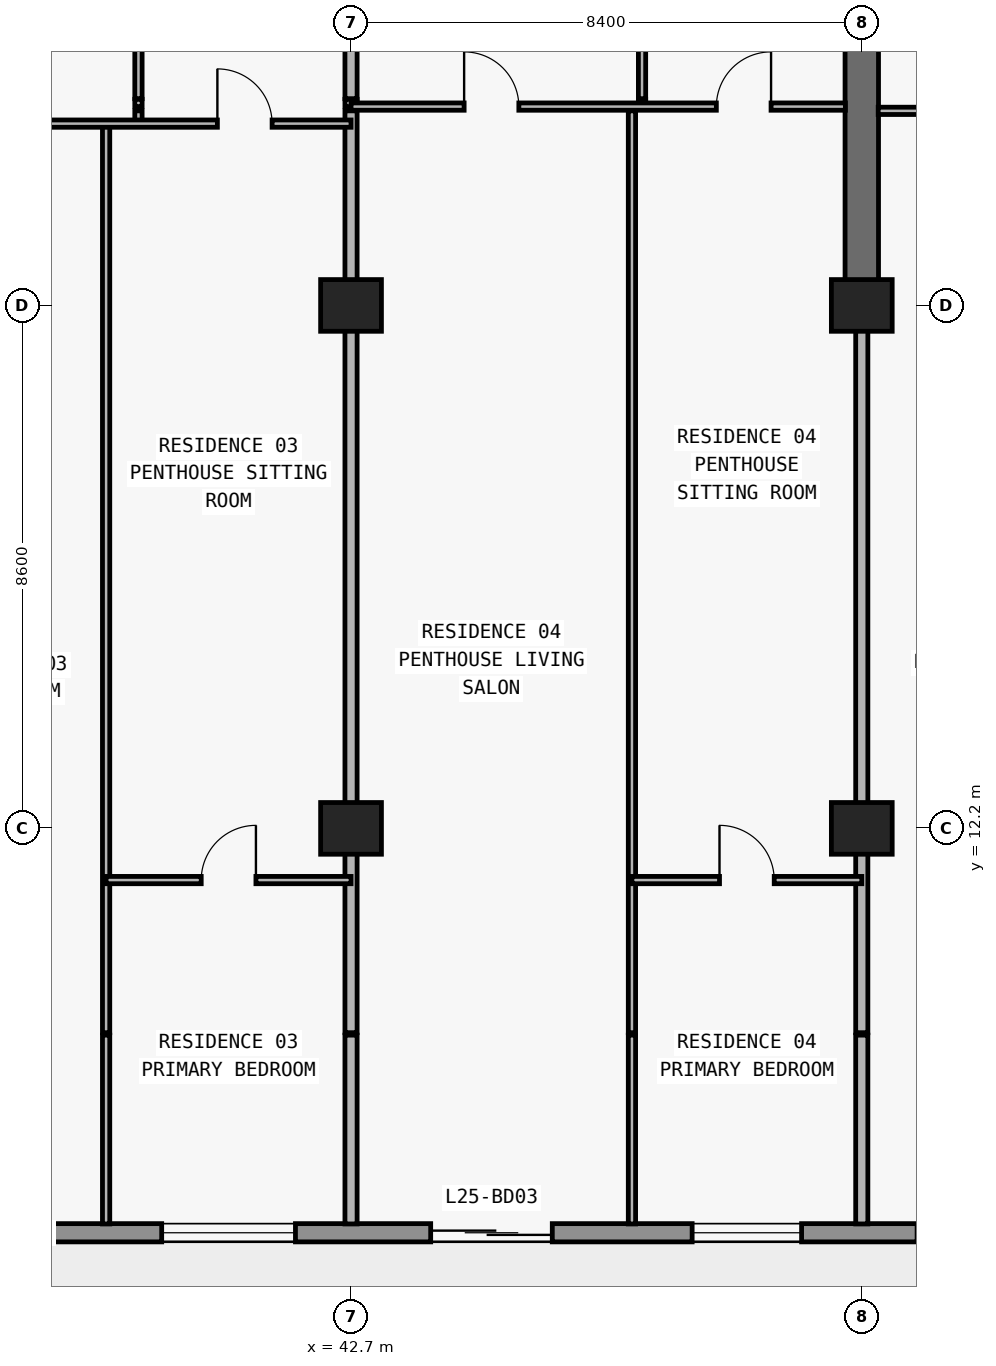
"""IFC4 building model, lengths in metres.
Left out: names, types, materials, properties, quantities, classifications, styles, units other than length and angle.
Written with IfcOpenShell. Run it as: python <this file> out.ifc"""

import sys

from ifc_helpers import new_model, si_unit, direction, frame, frame_2d, origin, origin_2d, place, context, subcontext, project, spatial, rectangle, extrude, element, fill, save


model = new_model("IFC4")
c1 = context("Model", 3, precision=1e-05, world=origin(), true_north=direction((0.0, 1.0)))
c2 = subcontext(c1, "Body", "Model", "MODEL_VIEW")
j1 = project(units=[si_unit("LENGTHUNIT", "METRE"), si_unit("PLANEANGLEUNIT", "RADIAN")], contexts=[c1])
p1 = place(None, origin())
s1 = spatial("IfcSite", under=j1, at=p1, CompositionType="ELEMENT")
p2 = place(p1, origin())
s2 = spatial("IfcBuilding", under=s1, at=p2, CompositionType="ELEMENT")
p3 = place(p2, frame((0.0, 0.0, 94.5)))
s3 = spatial("IfcBuildingStorey", under=s2, at=p3, CompositionType="ELEMENT", Elevation=94.5)
for number, where, z_axis, x_axis in (
    (1, (42.7, 12.2, 0.0), (0.0, 0.0, 1.0), (1.0, 0.0, 0.0)),
    (2, (51.1, 12.2, 0.0), (0.0, 0.0, 1.0), (1.0, 0.0, 0.0)),
    (3, (42.7, 20.8, 0.0), (0.0, 0.0, 1.0), (1.0, 0.0, 0.0)),
    (4, (51.1, 20.8, 0.0), (0.0, 0.0, 1.0), (1.0, 0.0, 0.0)),
):
    element("IfcColumn", number, at=place(p3, frame(where, z_axis=z_axis, x_axis=x_axis)), inside=s3, PredefinedType="COLUMN", context=c2, shape_type="SweptSolid", body=[
        extrude(rectangle(XDim=1.0, YDim=0.85, at=origin_2d()), origin(), (0.0, 0.0, 1.0), 3.0),
    ])
p4 = place(p3, frame((51.1, 20.8, 0.0), z_axis=(0.0, 0.0, 1.0), x_axis=(0.0, 1.0, 0.0)))
e5 = element("IfcWall", 5, at=p4, inside=s3, PredefinedType="SHEAR", context=c2, shape_type="SweptSolid", body=[
    extrude(rectangle(XDim=8.6, YDim=0.55, at=frame_2d((4.3, 0.0))), origin(), (0.0, 0.0, 1.0), 3.0),
])
p5 = place(p3, frame((70.1, 5.55, 0.0), z_axis=(0.0, 0.0, 1.0), x_axis=(-1.0, 0.0, 0.0)))
e6 = element("IfcWall", 6, at=p5, inside=s3, PredefinedType="STANDARD", context=c2, shape_type="SweptSolid", body=[
    extrude(rectangle(XDim=62.4, YDim=0.3, at=frame_2d((31.2, 0.0))), origin(), (0.0, 0.0, 1.0), 3.0),
])
p6 = place(p5, frame((57.29, 0.0, 0.0)))
e7 = element("IfcOpeningElement", 7, at=p6, cuts=e6, PredefinedType="OPENING", context=c2, shape_type="SweptSolid", body=[
    extrude(rectangle(XDim=2.0, YDim=2.3, at=frame_2d((1.0, 1.15))), frame((0.0, 0.16, 0.0), z_axis=(0.0, -1.0, 0.0), x_axis=(1.0, 0.0, 0.0)), (0.0, 0.0, 1.0), 0.32),
])
p7 = place(p5, frame((52.61, 0.0, 0.65)))
e8 = element("IfcOpeningElement", 8, at=p7, cuts=e6, PredefinedType="OPENING", context=c2, shape_type="SweptSolid", body=[
    extrude(rectangle(XDim=2.6, YDim=1.85, at=frame_2d((1.3, 0.925))), frame((0.0, 0.16, 0.0), z_axis=(0.0, -1.0, 0.0), x_axis=(1.0, 0.0, 0.0)), (0.0, 0.0, 1.0), 0.32),
])
p8 = place(p5, frame((46.5, 0.0, 0.85)))
e9 = element("IfcOpeningElement", 9, at=p8, cuts=e6, PredefinedType="OPENING", context=c2, shape_type="SweptSolid", body=[
    extrude(rectangle(XDim=2.2, YDim=1.55, at=frame_2d((1.1, 0.775))), frame((0.0, 0.16, 0.0), z_axis=(0.0, -1.0, 0.0), x_axis=(1.0, 0.0, 0.0)), (0.0, 0.0, 1.0), 0.32),
])
p9 = place(p5, frame((40.09, 0.0, 0.0)))
e10 = element("IfcOpeningElement", 10, at=p9, cuts=e6, PredefinedType="OPENING", context=c2, shape_type="SweptSolid", body=[
    extrude(rectangle(XDim=2.0, YDim=2.3, at=frame_2d((1.0, 1.15))), frame((0.0, 0.16, 0.0), z_axis=(0.0, -1.0, 0.0), x_axis=(1.0, 0.0, 0.0)), (0.0, 0.0, 1.0), 0.32),
])
p10 = place(p5, frame((35.99, 0.0, 0.85)))
e11 = element("IfcOpeningElement", 11, at=p10, cuts=e6, PredefinedType="OPENING", context=c2, shape_type="SweptSolid", body=[
    extrude(rectangle(XDim=1.8, YDim=1.55, at=frame_2d((0.9, 0.775))), frame((0.0, 0.16, 0.0), z_axis=(0.0, -1.0, 0.0), x_axis=(1.0, 0.0, 0.0)), (0.0, 0.0, 1.0), 0.32),
])
p11 = place(p5, frame((28.314, 0.0, 0.85)))
e12 = element("IfcOpeningElement", 12, at=p11, cuts=e6, PredefinedType="OPENING", context=c2, shape_type="SweptSolid", body=[
    extrude(rectangle(XDim=2.2, YDim=1.55, at=frame_2d((1.1, 0.775))), frame((0.0, 0.16, 0.0), z_axis=(0.0, -1.0, 0.0), x_axis=(1.0, 0.0, 0.0)), (0.0, 0.0, 1.0), 0.32),
])
p12 = place(p5, frame((24.09, 0.0, 0.0)))
e13 = element("IfcOpeningElement", 13, at=p12, cuts=e6, PredefinedType="OPENING", context=c2, shape_type="SweptSolid", body=[
    extrude(rectangle(XDim=2.0, YDim=2.3, at=frame_2d((1.0, 1.15))), frame((0.0, 0.16, 0.0), z_axis=(0.0, -1.0, 0.0), x_axis=(1.0, 0.0, 0.0)), (0.0, 0.0, 1.0), 0.32),
])
p13 = place(p5, frame((19.99, 0.0, 0.85)))
e14 = element("IfcOpeningElement", 14, at=p13, cuts=e6, PredefinedType="OPENING", context=c2, shape_type="SweptSolid", body=[
    extrude(rectangle(XDim=1.8, YDim=1.55, at=frame_2d((0.9, 0.775))), frame((0.0, 0.16, 0.0), z_axis=(0.0, -1.0, 0.0), x_axis=(1.0, 0.0, 0.0)), (0.0, 0.0, 1.0), 0.32),
])
p14 = place(p5, frame((16.09, 0.0, 0.0)))
e15 = element("IfcOpeningElement", 15, at=p14, cuts=e6, PredefinedType="OPENING", context=c2, shape_type="SweptSolid", body=[
    extrude(rectangle(XDim=2.0, YDim=2.3, at=frame_2d((1.0, 1.15))), frame((0.0, 0.16, 0.0), z_axis=(0.0, -1.0, 0.0), x_axis=(1.0, 0.0, 0.0)), (0.0, 0.0, 1.0), 0.32),
])
p15 = place(p5, frame((11.41, 0.0, 0.65)))
e16 = element("IfcOpeningElement", 16, at=p15, cuts=e6, PredefinedType="OPENING", context=c2, shape_type="SweptSolid", body=[
    extrude(rectangle(XDim=2.6, YDim=1.85, at=frame_2d((1.3, 0.925))), frame((0.0, 0.16, 0.0), z_axis=(0.0, -1.0, 0.0), x_axis=(1.0, 0.0, 0.0)), (0.0, 0.0, 1.0), 0.32),
])
p16 = place(p5, frame((5.3, 0.0, 0.85)))
e17 = element("IfcOpeningElement", 17, at=p16, cuts=e6, PredefinedType="OPENING", context=c2, shape_type="SweptSolid", body=[
    extrude(rectangle(XDim=2.2, YDim=1.55, at=frame_2d((1.1, 0.775))), frame((0.0, 0.16, 0.0), z_axis=(0.0, -1.0, 0.0), x_axis=(1.0, 0.0, 0.0)), (0.0, 0.0, 1.0), 0.32),
])
p17 = place(p3, frame((38.672, 5.695, 0.0), z_axis=(0.0, 0.0, 1.0), x_axis=(0.0, 1.0, 0.0)))
e18 = element("IfcWall", 18, at=p17, inside=s3, PredefinedType="PARTITIONING", context=c2, shape_type="SweptSolid", body=[
    extrude(rectangle(XDim=3.105, YDim=0.12, at=frame_2d((1.552, 0.0))), origin(), (0.0, 0.0, 1.0), 3.0),
])
p18 = place(p3, frame((38.672, 8.84, 0.0), z_axis=(0.0, 0.0, 1.0), x_axis=(0.0, 1.0, 0.0)))
e19 = element("IfcWall", 19, at=p18, inside=s3, PredefinedType="PARTITIONING", context=c2, shape_type="SweptSolid", body=[
    extrude(rectangle(XDim=14.95, YDim=0.12, at=frame_2d((7.475, 0.0))), origin(), (0.0, 0.0, 1.0), 2.436),
])
p19 = place(p3, frame((39.204, 23.79, 0.0), z_axis=(0.0, 0.0, 1.0), x_axis=(0.0, 1.0, 0.0)))
e20 = element("IfcWall", 20, at=p19, inside=s3, PredefinedType="PARTITIONING", context=c2, shape_type="SweptSolid", body=[
    extrude(rectangle(XDim=0.21, YDim=0.12, at=frame_2d((0.105, 0.0))), origin(), (0.0, 0.0, 1.0), 3.0),
])
p20 = place(p3, frame((39.204, 24.07, 0.0), z_axis=(0.0, 0.0, 1.0), x_axis=(0.0, 1.0, 0.0)))
e21 = element("IfcWall", 21, at=p20, inside=s3, PredefinedType="PARTITIONING", context=c2, shape_type="SweptSolid", body=[
    extrude(rectangle(XDim=0.12, YDim=0.12, at=frame_2d((0.06, 0.0))), origin(), (0.0, 0.0, 1.0), 3.0),
])
p21 = place(p3, frame((39.204, 24.2, 0.0), z_axis=(0.0, 0.0, 1.0), x_axis=(0.0, 1.0, 0.0)))
e22 = element("IfcWall", 22, at=p21, inside=s3, PredefinedType="PARTITIONING", context=c2, shape_type="SweptSolid", body=[
    extrude(rectangle(XDim=4.74, YDim=0.12, at=frame_2d((2.37, 0.0))), origin(), (0.0, 0.0, 1.0), 3.0),
])
p22 = place(p21, frame((1.92, 0.0, 0.0)))
e23 = element("IfcOpeningElement", 23, at=p22, cuts=e22, PredefinedType="OPENING", context=c2, shape_type="SweptSolid", body=[
    extrude(rectangle(XDim=0.9, YDim=2.15, at=frame_2d((0.45, 1.075))), frame((0.0, 0.07, 0.0), z_axis=(0.0, -1.0, 0.0), x_axis=(1.0, 0.0, 0.0)), (0.0, 0.0, 1.0), 0.14),
])
p23 = place(p3, frame((42.7, 5.695, 0.0), z_axis=(0.0, 0.0, 1.0), x_axis=(0.0, 1.0, 0.0)))
e24 = element("IfcWall", 24, at=p23, inside=s3, PredefinedType="PARTITIONING", context=c2, shape_type="SweptSolid", body=[
    extrude(rectangle(XDim=3.105, YDim=0.2, at=frame_2d((1.552, 0.0))), origin(), (0.0, 0.0, 1.0), 3.0),
])
p24 = place(p3, frame((42.7, 8.84, 0.0), z_axis=(0.0, 0.0, 1.0), x_axis=(0.0, 1.0, 0.0)))
e25 = element("IfcWall", 25, at=p24, inside=s3, PredefinedType="PARTITIONING", context=c2, shape_type="SweptSolid", body=[
    extrude(rectangle(XDim=15.16, YDim=0.2, at=frame_2d((7.58, 0.0))), origin(), (0.0, 0.0, 1.0), 2.124),
])
p25 = place(p3, frame((42.7, 24.07, 0.0), z_axis=(0.0, 0.0, 1.0), x_axis=(0.0, 1.0, 0.0)))
e26 = element("IfcWall", 26, at=p25, inside=s3, PredefinedType="PARTITIONING", context=c2, shape_type="SweptSolid", body=[
    extrude(rectangle(XDim=0.12, YDim=0.2, at=frame_2d((0.06, 0.0))), origin(), (0.0, 0.0, 1.0), 2.124),
])
p26 = place(p3, frame((42.7, 24.2, 0.0), z_axis=(0.0, 0.0, 1.0), x_axis=(0.0, 1.0, 0.0)))
e27 = element("IfcWall", 27, at=p26, inside=s3, PredefinedType="PARTITIONING", context=c2, shape_type="SweptSolid", body=[
    extrude(rectangle(XDim=5.14, YDim=0.2, at=frame_2d((2.57, 0.0))), origin(), (0.0, 0.0, 1.0), 2.124),
])
p27 = place(p3, frame((47.32, 5.695, 0.0), z_axis=(0.0, 0.0, 1.0), x_axis=(0.0, 1.0, 0.0)))
e28 = element("IfcWall", 28, at=p27, inside=s3, PredefinedType="PARTITIONING", context=c2, shape_type="SweptSolid", body=[
    extrude(rectangle(XDim=3.105, YDim=0.12, at=frame_2d((1.552, 0.0))), origin(), (0.0, 0.0, 1.0), 3.0),
])
p28 = place(p3, frame((47.32, 8.84, 0.0), z_axis=(0.0, 0.0, 1.0), x_axis=(0.0, 1.0, 0.0)))
e29 = element("IfcWall", 29, at=p28, inside=s3, PredefinedType="PARTITIONING", context=c2, shape_type="SweptSolid", body=[
    extrude(rectangle(XDim=15.16, YDim=0.12, at=frame_2d((7.58, 0.0))), origin(), (0.0, 0.0, 1.0), 3.0),
])
p29 = place(p3, frame((47.486, 24.07, 0.0), z_axis=(0.0, 0.0, 1.0), x_axis=(0.0, 1.0, 0.0)))
e30 = element("IfcWall", 30, at=p29, inside=s3, PredefinedType="PARTITIONING", context=c2, shape_type="SweptSolid", body=[
    extrude(rectangle(XDim=0.12, YDim=0.12, at=frame_2d((0.06, 0.0))), origin(), (0.0, 0.0, 1.0), 3.0),
])
p30 = place(p3, frame((47.486, 24.2, 0.0), z_axis=(0.0, 0.0, 1.0), x_axis=(0.0, 1.0, 0.0)))
e31 = element("IfcWall", 31, at=p30, inside=s3, PredefinedType="PARTITIONING", context=c2, shape_type="SweptSolid", body=[
    extrude(rectangle(XDim=5.02, YDim=0.12, at=frame_2d((2.51, 0.0))), origin(), (0.0, 0.0, 1.0), 3.0),
])
p31 = place(p30, frame((2.06, 0.0, 0.0)))
e32 = element("IfcOpeningElement", 32, at=p31, cuts=e31, PredefinedType="OPENING", context=c2, shape_type="SweptSolid", body=[
    extrude(rectangle(XDim=0.9, YDim=2.15, at=frame_2d((0.45, 1.075))), frame((0.0, 0.07, 0.0), z_axis=(0.0, -1.0, 0.0), x_axis=(1.0, 0.0, 0.0)), (0.0, 0.0, 1.0), 0.14),
])
p32 = place(p3, frame((51.1, 5.695, 0.0), z_axis=(0.0, 0.0, 1.0), x_axis=(0.0, 1.0, 0.0)))
e33 = element("IfcWall", 33, at=p32, inside=s3, PredefinedType="PARTITIONING", context=c2, shape_type="SweptSolid", body=[
    extrude(rectangle(XDim=3.105, YDim=0.2, at=frame_2d((1.552, 0.0))), origin(), (0.0, 0.0, 1.0), 3.0),
])
p33 = place(p3, frame((51.1, 8.84, 0.0), z_axis=(0.0, 0.0, 1.0), x_axis=(0.0, 1.0, 0.0)))
e34 = element("IfcWall", 34, at=p33, inside=s3, PredefinedType="PARTITIONING", context=c2, shape_type="SweptSolid", body=[
    extrude(rectangle(XDim=11.955, YDim=0.2, at=frame_2d((5.978, 0.0))), origin(), (0.0, 0.0, 1.0), 2.124),
])
p34 = place(p3, frame((38.672, 11.35, 0.0), z_axis=(0.0, 0.0, 1.0), x_axis=(1.0, 0.0, 0.0)))
e35 = element("IfcWall", 35, at=p34, inside=s3, PredefinedType="PARTITIONING", context=c2, shape_type="SweptSolid", body=[
    extrude(rectangle(XDim=4.028, YDim=0.12, at=frame_2d((2.014, 0.0))), origin(), (0.0, 0.0, 1.0), 3.0),
])
p35 = place(p34, frame((1.564, 0.0, 0.0)))
e36 = element("IfcOpeningElement", 36, at=p35, cuts=e35, PredefinedType="OPENING", context=c2, shape_type="SweptSolid", body=[
    extrude(rectangle(XDim=0.9, YDim=2.15, at=frame_2d((0.45, 1.075))), frame((0.0, 0.07, 0.0), z_axis=(0.0, -1.0, 0.0), x_axis=(1.0, 0.0, 0.0)), (0.0, 0.0, 1.0), 0.14),
])
p36 = place(p3, frame((47.32, 11.35, 0.0), z_axis=(0.0, 0.0, 1.0), x_axis=(1.0, 0.0, 0.0)))
e37 = element("IfcWall", 37, at=p36, inside=s3, PredefinedType="PARTITIONING", context=c2, shape_type="SweptSolid", body=[
    extrude(rectangle(XDim=3.78, YDim=0.12, at=frame_2d((1.89, 0.0))), origin(), (0.0, 0.0, 1.0), 3.0),
])
p37 = place(p36, frame((1.44, 0.0, 0.0)))
e38 = element("IfcOpeningElement", 38, at=p37, cuts=e37, PredefinedType="OPENING", context=c2, shape_type="SweptSolid", body=[
    extrude(rectangle(XDim=0.9, YDim=2.15, at=frame_2d((0.45, 1.075))), frame((0.0, 0.07, 0.0), z_axis=(0.0, -1.0, 0.0), x_axis=(1.0, 0.0, 0.0)), (0.0, 0.0, 1.0), 0.14),
])
p38 = place(p3, frame((35.1, 23.79, 0.0), z_axis=(0.0, 0.0, 1.0), x_axis=(1.0, 0.0, 0.0)))
e39 = element("IfcWall", 39, at=p38, inside=s3, PredefinedType="PARTITIONING", context=c2, shape_type="SweptSolid", body=[
    extrude(rectangle(XDim=7.6, YDim=0.12, at=frame_2d((3.8, 0.0))), origin(), (0.0, 0.0, 1.0), 3.0),
])
p39 = place(p38, frame((1.336, 0.0, 0.0)))
e40 = element("IfcOpeningElement", 40, at=p39, cuts=e39, PredefinedType="OPENING", context=c2, shape_type="SweptSolid", body=[
    extrude(rectangle(XDim=0.9, YDim=2.15, at=frame_2d((0.45, 1.075))), frame((0.0, 0.07, 0.0), z_axis=(0.0, -1.0, 0.0), x_axis=(1.0, 0.0, 0.0)), (0.0, 0.0, 1.0), 0.14),
])
p40 = place(p38, frame((5.402, 0.0, 0.0)))
e41 = element("IfcOpeningElement", 41, at=p40, cuts=e39, PredefinedType="OPENING", context=c2, shape_type="SweptSolid", body=[
    extrude(rectangle(XDim=0.9, YDim=2.15, at=frame_2d((0.45, 1.075))), frame((0.0, 0.07, 0.0), z_axis=(0.0, -1.0, 0.0), x_axis=(1.0, 0.0, 0.0)), (0.0, 0.0, 1.0), 0.14),
])
p41 = place(p3, frame((51.37, 24.0, 0.0), z_axis=(0.0, 0.0, 1.0), x_axis=(1.0, 0.0, 0.0)))
e42 = element("IfcWall", 42, at=p41, inside=s3, PredefinedType="PARTITIONING", context=c2, shape_type="SweptSolid", body=[
    extrude(rectangle(XDim=8.13, YDim=0.12, at=frame_2d((4.065, 0.0))), origin(), (0.0, 0.0, 1.0), 3.0),
])
p42 = place(p41, frame((1.305, 0.0, 0.0)))
e43 = element("IfcOpeningElement", 43, at=p42, cuts=e42, PredefinedType="OPENING", context=c2, shape_type="SweptSolid", body=[
    extrude(rectangle(XDim=0.9, YDim=2.15, at=frame_2d((0.45, 1.075))), frame((0.0, 0.07, 0.0), z_axis=(0.0, -1.0, 0.0), x_axis=(1.0, 0.0, 0.0)), (0.0, 0.0, 1.0), 0.14),
])
p43 = place(p3, frame((42.7, 24.07, 0.0), z_axis=(0.0, 0.0, 1.0), x_axis=(1.0, 0.0, 0.0)))
e44 = element("IfcWall", 44, at=p43, inside=s3, PredefinedType="PARTITIONING", context=c2, shape_type="SweptSolid", body=[
    extrude(rectangle(XDim=8.13, YDim=0.12, at=frame_2d((4.065, 0.0))), origin(), (0.0, 0.0, 1.0), 3.0),
])
p44 = place(p43, frame((1.86, 0.0, 0.0)))
e45 = element("IfcOpeningElement", 45, at=p44, cuts=e44, PredefinedType="OPENING", context=c2, shape_type="SweptSolid", body=[
    extrude(rectangle(XDim=0.9, YDim=2.15, at=frame_2d((0.45, 1.075))), frame((0.0, 0.07, 0.0), z_axis=(0.0, -1.0, 0.0), x_axis=(1.0, 0.0, 0.0)), (0.0, 0.0, 1.0), 0.14),
])
p45 = place(p43, frame((6.008, 0.0, 0.0)))
e46 = element("IfcOpeningElement", 46, at=p45, cuts=e44, PredefinedType="OPENING", context=c2, shape_type="SweptSolid", body=[
    extrude(rectangle(XDim=0.9, YDim=2.15, at=frame_2d((0.45, 1.075))), frame((0.0, 0.07, 0.0), z_axis=(0.0, -1.0, 0.0), x_axis=(1.0, 0.0, 0.0)), (0.0, 0.0, 1.0), 0.14),
])
p46 = place(p11, origin())
e47 = element("IfcWindow", 47, at=p46, inside=s3, PartitioningType="SINGLE_PANEL", PredefinedType="WINDOW", context=c2, shape_type="SweptSolid", body=[
    extrude(rectangle(XDim=2.2, YDim=1.55, at=frame_2d((1.1, 0.775))), frame((0.0, 0.03, 0.0), z_axis=(0.0, -1.0, 0.0), x_axis=(1.0, 0.0, 0.0)), (0.0, 0.0, 1.0), 0.06),
])
fill(e12, e47)
p47 = place(p12, origin())
e48 = element("IfcDoor", 48, at=p47, inside=s3, OperationType="DOUBLE_DOOR_SLIDING", PredefinedType="DOOR", context=c2, shape_type="SweptSolid", body=[
    extrude(rectangle(XDim=2.0, YDim=2.3, at=frame_2d((1.0, 1.15))), frame((0.0, 0.025, 0.0), z_axis=(0.0, -1.0, 0.0), x_axis=(1.0, 0.0, 0.0)), (0.0, 0.0, 1.0), 0.05),
])
fill(e13, e48)
p48 = place(p13, origin())
e49 = element("IfcWindow", 49, at=p48, inside=s3, PartitioningType="SINGLE_PANEL", PredefinedType="WINDOW", context=c2, shape_type="SweptSolid", body=[
    extrude(rectangle(XDim=1.8, YDim=1.55, at=frame_2d((0.9, 0.775))), frame((0.0, 0.03, 0.0), z_axis=(0.0, -1.0, 0.0), x_axis=(1.0, 0.0, 0.0)), (0.0, 0.0, 1.0), 0.06),
])
fill(e14, e49)
p49 = place(p40, origin())
e50 = element("IfcDoor", 50, at=p49, inside=s3, OperationType="SINGLE_SWING_LEFT", PredefinedType="DOOR", context=c2, shape_type="SweptSolid", body=[
    extrude(rectangle(XDim=0.9, YDim=2.15, at=frame_2d((0.45, 1.075))), frame((0.0, 0.025, 0.0), z_axis=(0.0, -1.0, 0.0), x_axis=(1.0, 0.0, 0.0)), (0.0, 0.0, 1.0), 0.05),
])
fill(e41, e50)
p50 = place(p35, origin())
e51 = element("IfcDoor", 51, at=p50, inside=s3, OperationType="SINGLE_SWING_RIGHT", PredefinedType="DOOR", context=c2, shape_type="SweptSolid", body=[
    extrude(rectangle(XDim=0.9, YDim=2.15, at=frame_2d((0.45, 1.075))), frame((0.0, 0.025, 0.0), z_axis=(0.0, -1.0, 0.0), x_axis=(1.0, 0.0, 0.0)), (0.0, 0.0, 1.0), 0.05),
])
fill(e36, e51)
p51 = place(p44, origin())
e52 = element("IfcDoor", 52, at=p51, inside=s3, OperationType="SINGLE_SWING_LEFT", PredefinedType="DOOR", context=c2, shape_type="SweptSolid", body=[
    extrude(rectangle(XDim=0.9, YDim=2.15, at=frame_2d((0.45, 1.075))), frame((0.0, 0.025, 0.0), z_axis=(0.0, -1.0, 0.0), x_axis=(1.0, 0.0, 0.0)), (0.0, 0.0, 1.0), 0.05),
])
fill(e45, e52)
p52 = place(p45, origin())
e53 = element("IfcDoor", 53, at=p52, inside=s3, OperationType="SINGLE_SWING_RIGHT", PredefinedType="DOOR", context=c2, shape_type="SweptSolid", body=[
    extrude(rectangle(XDim=0.9, YDim=2.15, at=frame_2d((0.45, 1.075))), frame((0.0, 0.025, 0.0), z_axis=(0.0, -1.0, 0.0), x_axis=(1.0, 0.0, 0.0)), (0.0, 0.0, 1.0), 0.05),
])
fill(e46, e53)
p53 = place(p37, origin())
e54 = element("IfcDoor", 54, at=p53, inside=s3, OperationType="SINGLE_SWING_LEFT", PredefinedType="DOOR", context=c2, shape_type="SweptSolid", body=[
    extrude(rectangle(XDim=0.9, YDim=2.15, at=frame_2d((0.45, 1.075))), frame((0.0, 0.025, 0.0), z_axis=(0.0, -1.0, 0.0), x_axis=(1.0, 0.0, 0.0)), (0.0, 0.0, 1.0), 0.05),
])
fill(e38, e54)
save(model, sys.argv[1])
